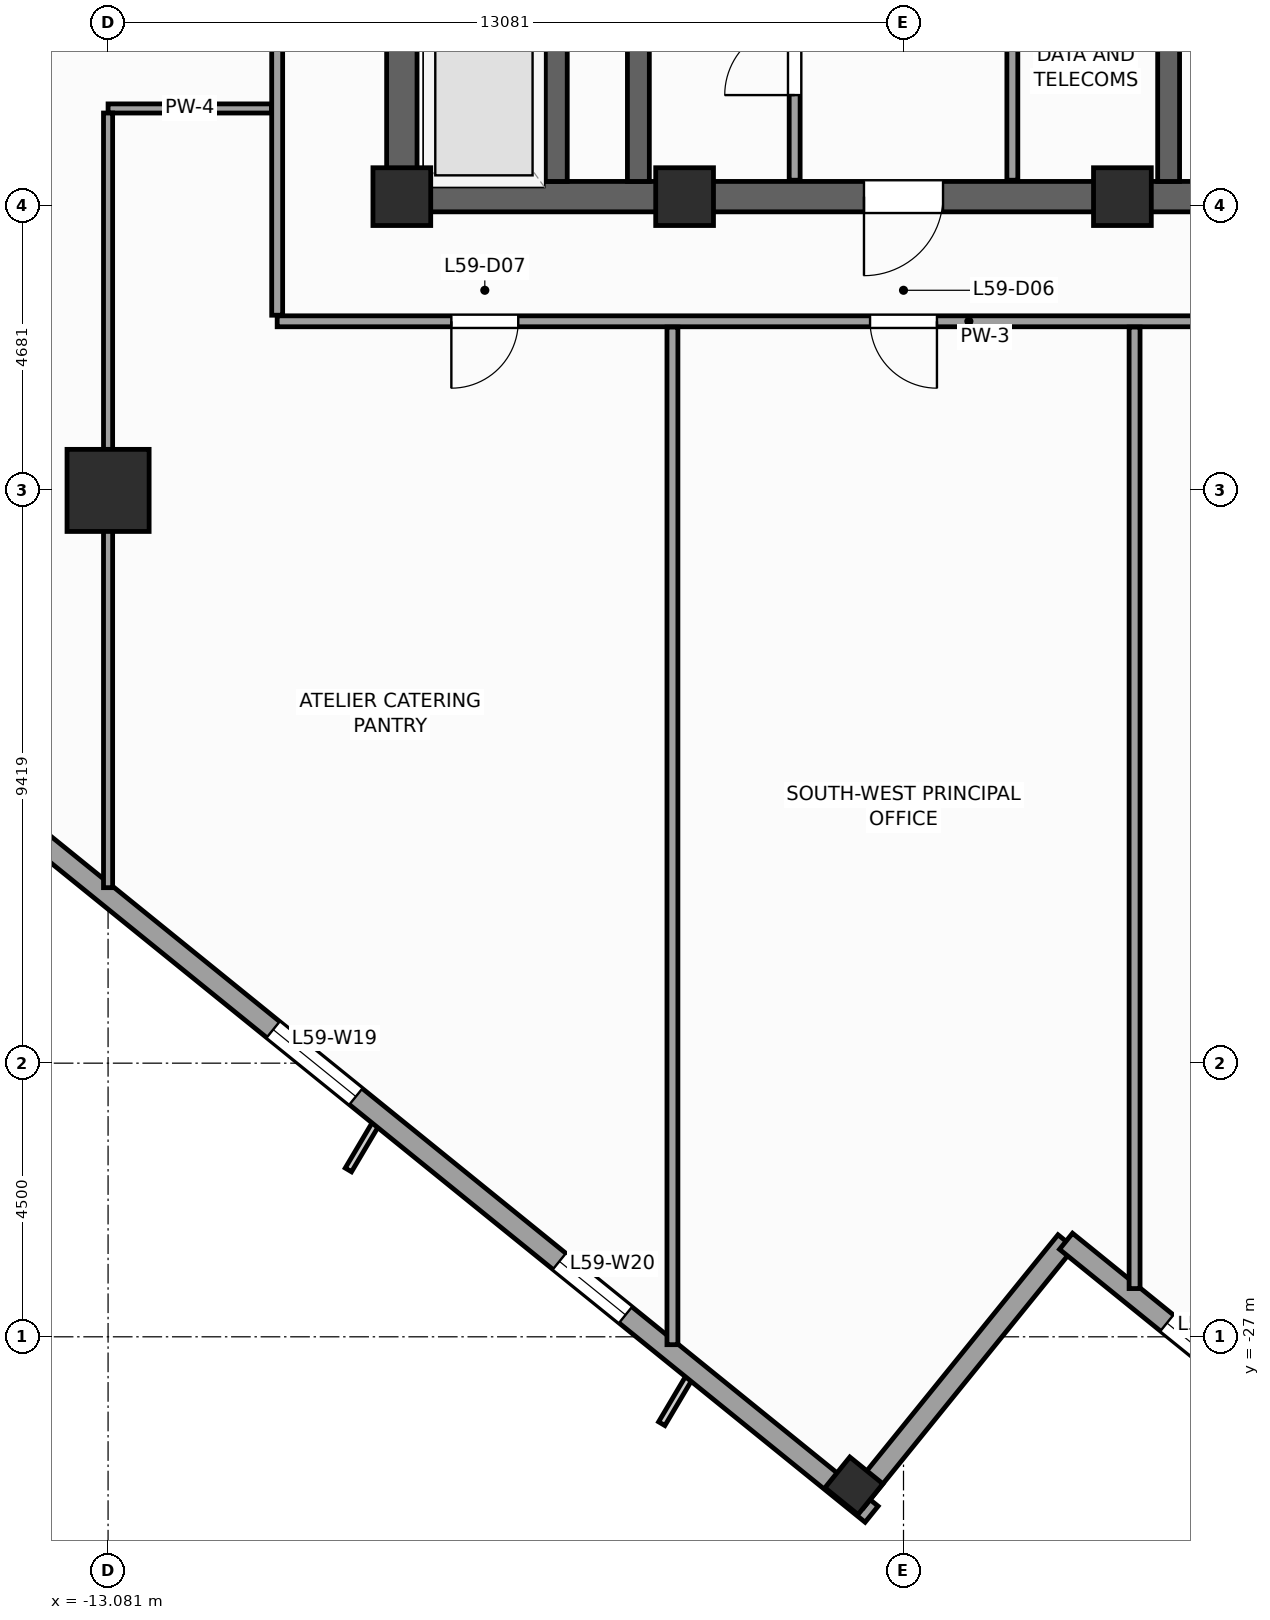
"""IFC4 building model, lengths in metres.
Left out: names, types, materials, properties, quantities, classifications, styles, units other than length and angle.
Written with IfcOpenShell. Run it as: python <this file> out.ifc"""

import sys

from ifc_helpers import new_model, si_unit, direction, frame, frame_2d, origin, origin_2d, place, context, subcontext, project, spatial, rectangle, extrude, source, transform, mapped, element, fill, save


model = new_model("IFC4")
c1 = context("Model", 3, precision=1e-05, world=origin(), true_north=direction((0.0, 1.0)))
c2 = subcontext(c1, "Body", "Model", "MODEL_VIEW")
j1 = project(units=[si_unit("LENGTHUNIT", "METRE"), si_unit("PLANEANGLEUNIT", "RADIAN")], contexts=[c1])
p1 = place(None, origin())
s1 = spatial("IfcSite", under=j1, at=p1, CompositionType="ELEMENT")
p2 = place(p1, origin())
s2 = spatial("IfcBuilding", under=s1, at=p2, CompositionType="ELEMENT")
p3 = place(p2, frame((0.0, 0.0, 244.6)))
s3 = spatial("IfcBuildingStorey", under=s2, at=p3, CompositionType="ELEMENT", Elevation=244.6)
p4 = place(p3, frame((-8.5, -8.25, 0.0), z_axis=(0.0, 0.0, 1.0), x_axis=(1.0, 0.0, 0.0)))
e1 = element("IfcWall", 1, at=p4, inside=s3, PredefinedType="SHEAR", context=c2, shape_type="SweptSolid", body=[
    extrude(rectangle(XDim=17.0, YDim=0.5, at=frame_2d((8.5, 0.0))), origin(), (0.0, 0.0, 1.0), 3.9),
])
p5 = place(p4, frame((7.85, 0.0, 0.0)))
e2 = element("IfcOpeningElement", 2, at=p5, cuts=e1, PredefinedType="OPENING", context=c2, shape_type="SweptSolid", body=[
    extrude(rectangle(XDim=1.3, YDim=2.2, at=frame_2d((0.65, 1.1))), frame((0.0, 0.26, 0.0), z_axis=(0.0, -1.0, 0.0), x_axis=(1.0, 0.0, 0.0)), (0.0, 0.0, 1.0), 0.52),
])
p6 = place(p3, frame((-8.25, -8.0, 0.0), z_axis=(0.0, 0.0, 1.0), x_axis=(0.0, 1.0, 0.0)))
e3 = element("IfcWall", 3, at=p6, inside=s3, PredefinedType="SHEAR", context=c2, shape_type="SweptSolid", body=[
    extrude(rectangle(XDim=16.0, YDim=0.5, at=frame_2d((8.0, 0.0))), origin(), (0.0, 0.0, 1.0), 3.9),
])
p7 = place(p6, frame((4.69, 0.0, 0.0)))
e4 = element("IfcOpeningElement", 4, at=p7, cuts=e3, PredefinedType="OPENING", context=c2, shape_type="SweptSolid", body=[
    extrude(rectangle(XDim=1.3, YDim=2.2, at=frame_2d((0.65, 1.1))), frame((0.0, 0.26, 0.0), z_axis=(0.0, -1.0, 0.0), x_axis=(1.0, 0.0, 0.0)), (0.0, 0.0, 1.0), 0.52),
])
for number, where, z_axis, x_axis in (
    (5, (-4.36, -8.0, 0.0), (0.0, 0.0, 1.0), (0.0, 1.0, 0.0)),
    (6, (4.36, -8.0, 0.0), (0.0, 0.0, 1.0), (0.0, 1.0, 0.0)),
):
    element("IfcWall", number, at=place(p3, frame(where, z_axis=z_axis, x_axis=x_axis)), inside=s3, PredefinedType="SHEAR", context=c2, shape_type="SweptSolid", body=[
        extrude(rectangle(XDim=16.0, YDim=0.36, at=frame_2d((8.0, 0.0))), origin(), (0.0, 0.0, 1.0), 3.9),
    ])
p8 = place(p3, frame((-5.71, -8.0, 0.0), z_axis=(0.0, 0.0, 1.0), x_axis=(0.0, 1.0, 0.0)))
e7 = element("IfcWall", 7, at=p8, inside=s3, PredefinedType="SHEAR", context=c2, shape_type="SweptSolid", body=[
    extrude(rectangle(XDim=2.54, YDim=0.36, at=frame_2d((1.27, 0.0))), origin(), (0.0, 0.0, 1.0), 3.9),
])
m1 = source(origin(), c2, "Body", "SweptSolid", [
    extrude(rectangle(XDim=0.95, YDim=0.95, at=origin_2d()), origin(), (0.0, 0.0, 1.0), 3.9),
])
for number, where, z_axis, x_axis in (
    (8, (-8.25, -8.25, 0.0), (0.0, 0.0, 1.0), (1.0, 0.0, 0.0)),
    (9, (-3.6, -8.25, 0.0), (0.0, 0.0, 1.0), (1.0, 0.0, 0.0)),
    (10, (3.6, -8.25, 0.0), (0.0, 0.0, 1.0), (1.0, 0.0, 0.0)),
):
    element("IfcColumn", number, at=place(p3, frame(where, z_axis=z_axis, x_axis=x_axis)), inside=s3, PredefinedType="PILASTER", context=c2, shape_type="MappedRepresentation", body=[
        mapped(m1, transform((0.0, 0.0, 0.0), scale=1.0)),
    ])
m2 = source(origin(), c2, "Body", "SweptSolid", [
    extrude(rectangle(XDim=1.35, YDim=1.35, at=origin_2d()), origin(), (0.0, 0.0, 1.0), 3.9),
])
p9 = place(p3, frame((-13.081, -13.081, 0.0), z_axis=(0.0, 0.0, 1.0), x_axis=(1.0, 0.0, 0.0)))
e11 = element("IfcColumn", 11, at=p9, inside=s3, PredefinedType="COLUMN", context=c2, shape_type="MappedRepresentation", body=[
    mapped(m2, transform((0.0, 0.0, 0.0), scale=1.0)),
])
m3 = source(origin(), c2, "Body", "SweptSolid", [
    extrude(rectangle(XDim=0.65, YDim=0.7, at=origin_2d()), origin(), (0.0, 0.0, 1.0), 3.9),
])
p10 = place(p3, frame((-0.815, -29.45, 0.0), z_axis=(0.0, 0.0, 1.0), x_axis=(0.62932039105, 0.777145961457, 0.0)))
e12 = element("IfcColumn", 12, at=p10, inside=s3, PredefinedType="COLUMN", context=c2, shape_type="MappedRepresentation", body=[
    mapped(m3, transform((0.0, 0.0, 0.0), scale=1.0)),
])
p11 = place(p3, frame((-29.154, -6.733, 0.0), z_axis=(0.0, 0.0, 1.0), x_axis=(0.77714192302, -0.629325378072, 0.0)))
e13 = element("IfcWall", 13, at=p11, inside=s3, PredefinedType="STANDARD", context=c2, shape_type="SweptSolid", body=[
    extrude(rectangle(XDim=36.84, YDim=0.34, at=frame_2d((18.42, 0.0))), origin(), (0.0, 0.0, 1.0), 2.96),
])
p12 = place(p11, frame((3.721, 0.0, 0.48)))
e14 = element("IfcOpeningElement", 14, at=p12, cuts=e13, PredefinedType="OPENING", context=c2, shape_type="SweptSolid", body=[
    extrude(rectangle(XDim=1.4, YDim=2.4, at=frame_2d((0.7, 1.2))), frame((0.0, 0.18, 0.0), z_axis=(0.0, -1.0, 0.0), x_axis=(1.0, 0.0, 0.0)), (0.0, 0.0, 1.0), 0.36),
])
p13 = place(p11, frame((9.809, 0.0, 0.58)))
e15 = element("IfcOpeningElement", 15, at=p13, cuts=e13, PredefinedType="OPENING", context=c2, shape_type="SweptSolid", body=[
    extrude(rectangle(XDim=1.75, YDim=2.3, at=frame_2d((0.875, 1.15))), frame((0.0, 0.18, 0.0), z_axis=(0.0, -1.0, 0.0), x_axis=(1.0, 0.0, 0.0)), (0.0, 0.0, 1.0), 0.36),
])
p14 = place(p11, frame((16.058, 0.0, 0.58)))
e16 = element("IfcOpeningElement", 16, at=p14, cuts=e13, PredefinedType="OPENING", context=c2, shape_type="SweptSolid", body=[
    extrude(rectangle(XDim=1.75, YDim=2.3, at=frame_2d((0.875, 1.15))), frame((0.0, 0.18, 0.0), z_axis=(0.0, -1.0, 0.0), x_axis=(1.0, 0.0, 0.0)), (0.0, 0.0, 1.0), 0.36),
])
p15 = place(p11, frame((24.176, 0.0, 0.58)))
e17 = element("IfcOpeningElement", 17, at=p15, cuts=e13, PredefinedType="OPENING", context=c2, shape_type="SweptSolid", body=[
    extrude(rectangle(XDim=1.75, YDim=2.3, at=frame_2d((0.875, 1.15))), frame((0.0, 0.18, 0.0), z_axis=(0.0, -1.0, 0.0), x_axis=(1.0, 0.0, 0.0)), (0.0, 0.0, 1.0), 0.36),
])
p16 = place(p11, frame((30.232, 0.0, 0.48)))
e18 = element("IfcOpeningElement", 18, at=p16, cuts=e13, PredefinedType="OPENING", context=c2, shape_type="SweptSolid", body=[
    extrude(rectangle(XDim=1.4, YDim=2.4, at=frame_2d((0.7, 1.2))), frame((0.0, 0.18, 0.0), z_axis=(0.0, -1.0, 0.0), x_axis=(1.0, 0.0, 0.0)), (0.0, 0.0, 1.0), 0.36),
])
p17 = place(p3, frame((-0.789, -29.703, 0.0), z_axis=(0.0, 0.0, 1.0), x_axis=(0.629323365087, 0.77714355312, 0.0)))
e19 = element("IfcWall", 19, at=p17, inside=s3, PredefinedType="STANDARD", context=c2, shape_type="SweptSolid", body=[
    extrude(rectangle(XDim=5.5, YDim=0.34, at=frame_2d((2.75, 0.0))), origin(), (0.0, 0.0, 1.0), 3.66),
])
p18 = place(p3, frame((2.673, -25.429, 0.0), z_axis=(0.0, 0.0, 1.0), x_axis=(0.777162640055, -0.629299794138, 0.0)))
e20 = element("IfcWall", 20, at=p18, inside=s3, PredefinedType="STANDARD", context=c2, shape_type="SweptSolid", body=[
    extrude(rectangle(XDim=5.67, YDim=0.34, at=frame_2d((2.835, 0.0))), origin(), (0.0, 0.0, 1.0), 3.66),
])
p19 = place(p18, frame((2.135, 0.0, 0.48)))
e21 = element("IfcOpeningElement", 21, at=p19, cuts=e20, PredefinedType="OPENING", context=c2, shape_type="SweptSolid", body=[
    extrude(rectangle(XDim=1.4, YDim=2.4, at=frame_2d((0.7, 1.2))), frame((0.0, 0.18, 0.0), z_axis=(0.0, -1.0, 0.0), x_axis=(1.0, 0.0, 0.0)), (0.0, 0.0, 1.0), 0.36),
])
p20 = place(p3, frame((-1.79, -7.98, 0.0), z_axis=(0.0, 0.0, 1.0), x_axis=(0.0, 1.0, 0.0)))
e22 = element("IfcWall", 22, at=p20, inside=s3, PredefinedType="PARTITIONING", context=c2, shape_type="SweptSolid", body=[
    extrude(rectangle(XDim=12.38, YDim=0.18, at=frame_2d((6.19, 0.0))), origin(), (0.0, 0.0, 1.0), 3.66),
])
p21 = place(p20, frame((8.8, 0.0, 0.0)))
e23 = element("IfcOpeningElement", 23, at=p21, cuts=e22, PredefinedType="OPENING", context=c2, shape_type="SweptSolid", body=[
    extrude(rectangle(XDim=1.1, YDim=2.2, at=frame_2d((0.55, 1.1))), frame((0.0, 0.1, 0.0), z_axis=(0.0, -1.0, 0.0), x_axis=(1.0, 0.0, 0.0)), (0.0, 0.0, 1.0), 0.2),
])
p22 = place(p20, frame((10.86, 0.0, 0.0)))
e24 = element("IfcOpeningElement", 24, at=p22, cuts=e22, PredefinedType="OPENING", context=c2, shape_type="SweptSolid", body=[
    extrude(rectangle(XDim=1.1, YDim=2.2, at=frame_2d((0.55, 1.1))), frame((0.0, 0.1, 0.0), z_axis=(0.0, -1.0, 0.0), x_axis=(1.0, 0.0, 0.0)), (0.0, 0.0, 1.0), 0.2),
])
p23 = place(p20, frame((1.4, 0.0, 0.0)))
e25 = element("IfcOpeningElement", 25, at=p23, cuts=e22, PredefinedType="OPENING", context=c2, shape_type="SweptSolid", body=[
    extrude(rectangle(XDim=1.15, YDim=2.25, at=frame_2d((0.575, 1.125))), frame((0.0, 0.1, 0.0), z_axis=(0.0, -1.0, 0.0), x_axis=(1.0, 0.0, 0.0)), (0.0, 0.0, 1.0), 0.2),
])
p24 = place(p20, frame((5.6, 0.0, 0.0)))
e26 = element("IfcOpeningElement", 26, at=p24, cuts=e22, PredefinedType="OPENING", context=c2, shape_type="SweptSolid", body=[
    extrude(rectangle(XDim=1.15, YDim=2.25, at=frame_2d((0.575, 1.125))), frame((0.0, 0.1, 0.0), z_axis=(0.0, -1.0, 0.0), x_axis=(1.0, 0.0, 0.0)), (0.0, 0.0, 1.0), 0.2),
])
p25 = place(p3, frame((1.79, -7.98, 0.0), z_axis=(0.0, 0.0, 1.0), x_axis=(0.0, 1.0, 0.0)))
e27 = element("IfcWall", 27, at=p25, inside=s3, PredefinedType="PARTITIONING", context=c2, shape_type="SweptSolid", body=[
    extrude(rectangle(XDim=12.38, YDim=0.18, at=frame_2d((6.19, 0.0))), origin(), (0.0, 0.0, 1.0), 3.66),
])
p26 = place(p25, frame((8.8, 0.0, 0.0)))
e28 = element("IfcOpeningElement", 28, at=p26, cuts=e27, PredefinedType="OPENING", context=c2, shape_type="SweptSolid", body=[
    extrude(rectangle(XDim=1.1, YDim=2.2, at=frame_2d((0.55, 1.1))), frame((0.0, 0.1, 0.0), z_axis=(0.0, -1.0, 0.0), x_axis=(1.0, 0.0, 0.0)), (0.0, 0.0, 1.0), 0.2),
])
p27 = place(p25, frame((10.86, 0.0, 0.0)))
e29 = element("IfcOpeningElement", 29, at=p27, cuts=e27, PredefinedType="OPENING", context=c2, shape_type="SweptSolid", body=[
    extrude(rectangle(XDim=1.1, YDim=2.2, at=frame_2d((0.55, 1.1))), frame((0.0, 0.1, 0.0), z_axis=(0.0, -1.0, 0.0), x_axis=(1.0, 0.0, 0.0)), (0.0, 0.0, 1.0), 0.2),
])
p28 = place(p25, frame((3.5, 0.0, 0.0)))
e30 = element("IfcOpeningElement", 30, at=p28, cuts=e27, PredefinedType="OPENING", context=c2, shape_type="SweptSolid", body=[
    extrude(rectangle(XDim=1.15, YDim=2.25, at=frame_2d((0.575, 1.125))), frame((0.0, 0.1, 0.0), z_axis=(0.0, -1.0, 0.0), x_axis=(1.0, 0.0, 0.0)), (0.0, 0.0, 1.0), 0.2),
])
p29 = place(p3, frame((-10.3, -10.3, 0.0), z_axis=(0.0, 0.0, 1.0), x_axis=(1.0, 0.0, 0.0)))
e31 = element("IfcWall", 31, at=p29, inside=s3, PredefinedType="PARTITIONING", context=c2, shape_type="SweptSolid", body=[
    extrude(rectangle(XDim=22.75, YDim=0.18, at=frame_2d((11.375, 0.0))), origin(), (0.0, 0.0, 1.0), 3.66),
])
p30 = place(p29, frame((9.75, 0.0, 0.0)))
e32 = element("IfcOpeningElement", 32, at=p30, cuts=e31, PredefinedType="OPENING", context=c2, shape_type="SweptSolid", body=[
    extrude(rectangle(XDim=1.1, YDim=2.2, at=frame_2d((0.55, 1.1))), frame((0.0, 0.1, 0.0), z_axis=(0.0, -1.0, 0.0), x_axis=(1.0, 0.0, 0.0)), (0.0, 0.0, 1.0), 0.2),
])
p31 = place(p29, frame((2.865, 0.0, 0.0)))
e33 = element("IfcOpeningElement", 33, at=p31, cuts=e31, PredefinedType="OPENING", context=c2, shape_type="SweptSolid", body=[
    extrude(rectangle(XDim=1.1, YDim=2.2, at=frame_2d((0.55, 1.1))), frame((0.0, 0.1, 0.0), z_axis=(0.0, -1.0, 0.0), x_axis=(1.0, 0.0, 0.0)), (0.0, 0.0, 1.0), 0.2),
])
p32 = place(p3, frame((-10.3, -10.2, 0.0), z_axis=(0.0, 0.0, 1.0), x_axis=(0.0, 1.0, 0.0)))
e34 = element("IfcWall", 34, at=p32, inside=s3, PredefinedType="PARTITIONING", context=c2, shape_type="SweptSolid", body=[
    extrude(rectangle(XDim=21.5, YDim=0.18, at=frame_2d((10.75, 0.0))), origin(), (0.0, 0.0, 1.0), 3.66),
])
p33 = place(p32, frame((15.135, 0.0, 0.0)))
e35 = element("IfcOpeningElement", 35, at=p33, cuts=e34, PredefinedType="OPENING", context=c2, shape_type="SweptSolid", body=[
    extrude(rectangle(XDim=1.1, YDim=2.2, at=frame_2d((0.55, 1.1))), frame((0.0, 0.1, 0.0), z_axis=(0.0, -1.0, 0.0), x_axis=(1.0, 0.0, 0.0)), (0.0, 0.0, 1.0), 0.2),
])
p34 = place(p32, frame((6.25, 0.0, 0.0)))
e36 = element("IfcOpeningElement", 36, at=p34, cuts=e34, PredefinedType="OPENING", context=c2, shape_type="SweptSolid", body=[
    extrude(rectangle(XDim=1.1, YDim=2.2, at=frame_2d((0.55, 1.1))), frame((0.0, 0.1, 0.0), z_axis=(0.0, -1.0, 0.0), x_axis=(1.0, 0.0, 0.0)), (0.0, 0.0, 1.0), 0.2),
])
p35 = place(p3, frame((3.8, -10.395, 0.0), z_axis=(0.0, 0.0, 1.0), x_axis=(0.0, -1.0, 0.0)))
e37 = element("IfcWall", 37, at=p35, inside=s3, PredefinedType="PARTITIONING", context=c2, shape_type="SweptSolid", body=[
    extrude(rectangle(XDim=15.812, YDim=0.18, at=frame_2d((7.906, 0.0))), origin(), (0.0, 0.0, 1.0), 3.66),
])
p36 = place(p3, frame((-3.8, -10.395, 0.0), z_axis=(0.0, 0.0, 1.0), x_axis=(0.0, -1.0, 0.0)))
e38 = element("IfcWall", 38, at=p36, inside=s3, PredefinedType="PARTITIONING", context=c2, shape_type="SweptSolid", body=[
    extrude(rectangle(XDim=16.734, YDim=0.18, at=frame_2d((8.367, 0.0))), origin(), (0.0, 0.0, 1.0), 3.66),
])
p37 = place(p3, frame((-10.395, -6.8, 0.0), z_axis=(0.0, 0.0, 1.0), x_axis=(-1.0, 0.0, 0.0)))
e39 = element("IfcWall", 39, at=p37, inside=s3, PredefinedType="PARTITIONING", context=c2, shape_type="SweptSolid", body=[
    extrude(rectangle(XDim=2.686, YDim=0.15, at=frame_2d((1.343, 0.0))), origin(), (0.0, 0.0, 1.0), 3.66),
])
p38 = place(p3, frame((-13.081, -6.875, 0.0), z_axis=(0.0, 0.0, 1.0), x_axis=(0.0, -1.0, 0.0)))
e40 = element("IfcWall", 40, at=p38, inside=s3, PredefinedType="PARTITIONING", context=c2, shape_type="SweptSolid", body=[
    extrude(rectangle(XDim=12.739, YDim=0.15, at=frame_2d((6.37, 0.0))), origin(), (0.0, 0.0, 1.0), 2.76),
])
m4 = source(origin(), c2, "Body", "SweptSolid", [
    extrude(rectangle(XDim=1.75, YDim=2.3, at=frame_2d((0.875, 1.15))), frame((0.0, 0.03, 0.0), z_axis=(0.0, -1.0, 0.0), x_axis=(1.0, 0.0, 0.0)), (0.0, 0.0, 1.0), 0.06),
])
p39 = place(p15, origin())
e41 = element("IfcWindow", 41, at=p39, inside=s3, PartitioningType="SINGLE_PANEL", PredefinedType="WINDOW", context=c2, shape_type="MappedRepresentation", body=[
    mapped(m4, transform((0.0, 0.0, 0.0), scale=1.0)),
])
fill(e17, e41)
m5 = source(origin(), c2, "Body", "SweptSolid", [
    extrude(rectangle(XDim=1.4, YDim=2.4, at=frame_2d((0.7, 1.2))), frame((0.0, 0.03, 0.0), z_axis=(0.0, -1.0, 0.0), x_axis=(1.0, 0.0, 0.0)), (0.0, 0.0, 1.0), 0.06),
])
p40 = place(p16, origin())
e42 = element("IfcWindow", 42, at=p40, inside=s3, PartitioningType="SINGLE_PANEL", PredefinedType="WINDOW", context=c2, shape_type="MappedRepresentation", body=[
    mapped(m5, transform((0.0, 0.0, 0.0), scale=1.0)),
])
fill(e18, e42)
p41 = place(p19, origin())
e43 = element("IfcWindow", 43, at=p41, inside=s3, PartitioningType="SINGLE_PANEL", PredefinedType="WINDOW", context=c2, shape_type="MappedRepresentation", body=[
    mapped(m5, transform((0.0, 0.0, 0.0), scale=1.0)),
])
fill(e21, e43)
m6 = source(origin(), c2, "Body", "SweptSolid", [
    extrude(rectangle(XDim=1.3, YDim=2.2, at=frame_2d((0.65, 1.1))), frame((0.0, 0.025, 0.0), z_axis=(0.0, -1.0, 0.0), x_axis=(1.0, 0.0, 0.0)), (0.0, 0.0, 1.0), 0.05),
])
p42 = place(p5, frame((1.3, 0.0, 0.0), z_axis=(0.0, 0.0, 1.0), x_axis=(-1.0, 0.0, 0.0)))
e44 = element("IfcDoor", 44, at=p42, inside=s3, OperationType="SINGLE_SWING_LEFT", PredefinedType="DOOR", context=c2, shape_type="MappedRepresentation", body=[
    mapped(m6, transform((0.0, 0.0, 0.0), scale=1.0)),
])
fill(e2, e44)
m7 = source(origin(), c2, "Body", "SweptSolid", [
    extrude(rectangle(XDim=1.15, YDim=2.25, at=frame_2d((0.575, 1.125))), frame((0.0, 0.025, 0.0), z_axis=(0.0, -1.0, 0.0), x_axis=(1.0, 0.0, 0.0)), (0.0, 0.0, 1.0), 0.05),
])
p43 = place(p23, origin())
e45 = element("IfcDoor", 45, at=p43, inside=s3, OperationType="SINGLE_SWING_LEFT", PredefinedType="DOOR", context=c2, shape_type="MappedRepresentation", body=[
    mapped(m7, transform((0.0, 0.0, 0.0), scale=1.0)),
])
fill(e25, e45)
m8 = source(origin(), c2, "Body", "SweptSolid", [
    extrude(rectangle(XDim=1.1, YDim=2.2, at=frame_2d((0.55, 1.1))), frame((0.0, 0.025, 0.0), z_axis=(0.0, -1.0, 0.0), x_axis=(1.0, 0.0, 0.0)), (0.0, 0.0, 1.0), 0.05),
])
p44 = place(p30, frame((1.1, 0.0, 0.0), z_axis=(0.0, 0.0, 1.0), x_axis=(-1.0, 0.0, 0.0)))
e46 = element("IfcDoor", 46, at=p44, inside=s3, OperationType="SINGLE_SWING_RIGHT", PredefinedType="DOOR", context=c2, shape_type="MappedRepresentation", body=[
    mapped(m8, transform((0.0, 0.0, 0.0), scale=1.0)),
])
fill(e32, e46)
p45 = place(p31, frame((1.1, 0.0, 0.0), z_axis=(0.0, 0.0, 1.0), x_axis=(-1.0, 0.0, 0.0)))
e47 = element("IfcDoor", 47, at=p45, inside=s3, OperationType="SINGLE_SWING_LEFT", PredefinedType="DOOR", context=c2, shape_type="MappedRepresentation", body=[
    mapped(m8, transform((0.0, 0.0, 0.0), scale=1.0)),
])
fill(e33, e47)
save(model, sys.argv[1])
